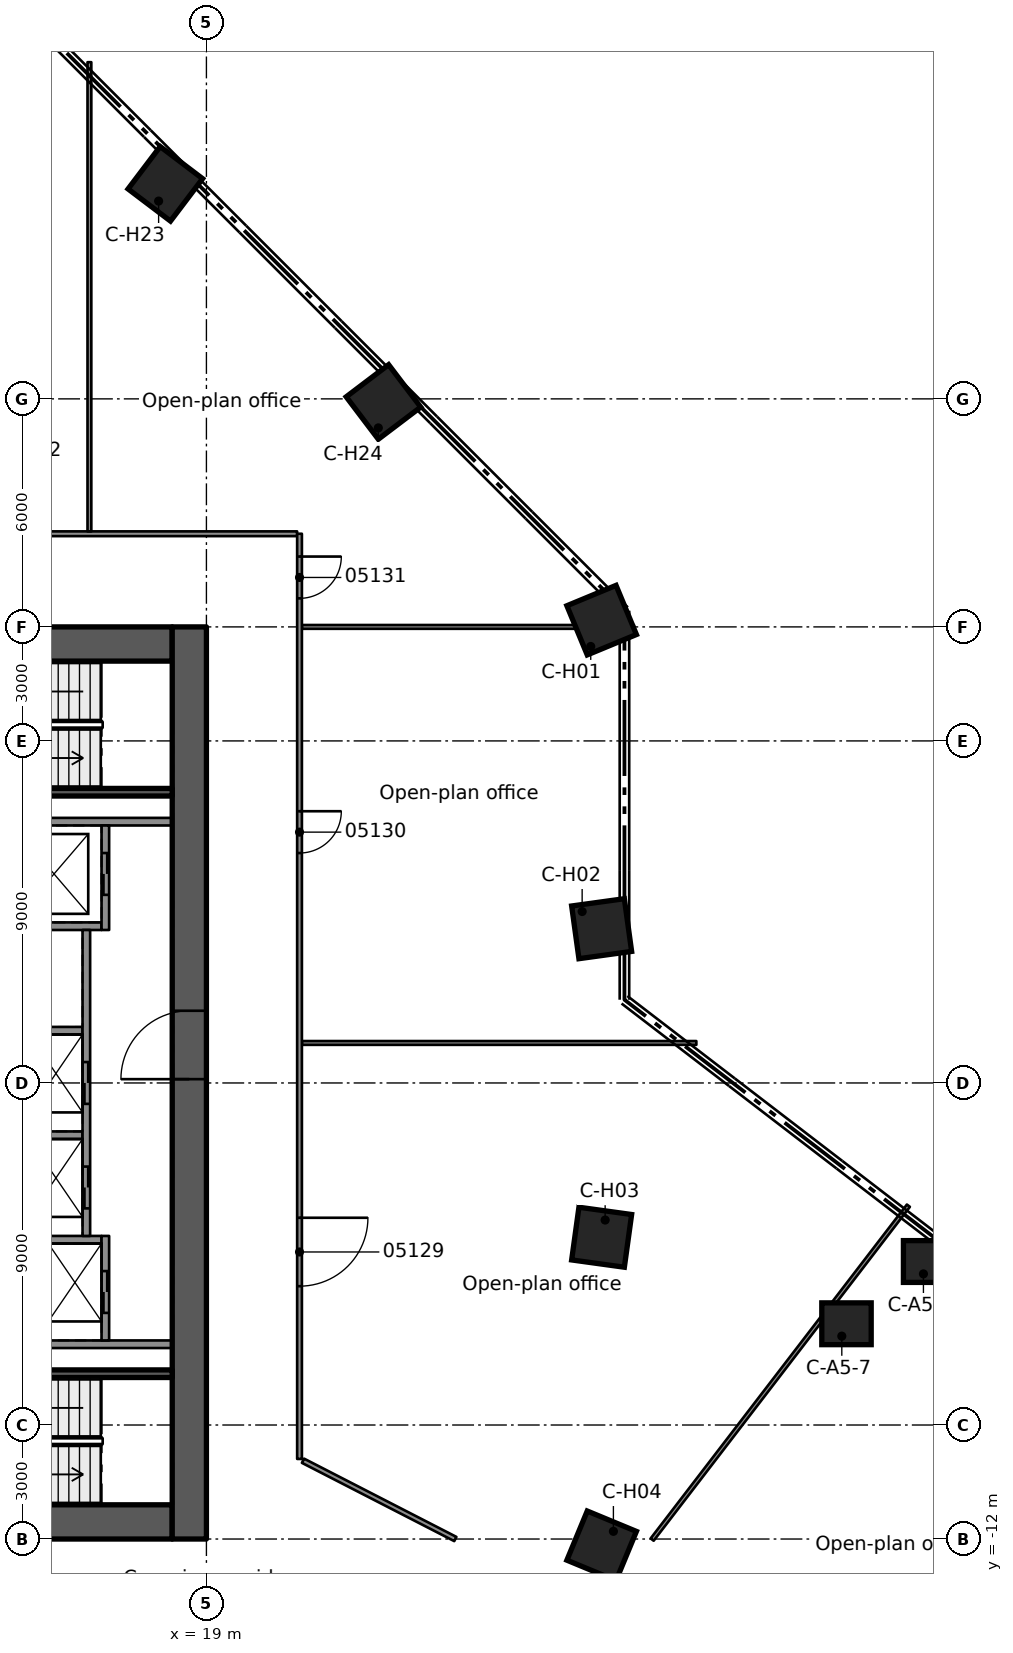
"""IFC4 building model, lengths in metres.
Left out: names, types, materials, properties, quantities, classifications, styles, units other than length and angle.
Written with IfcOpenShell. Run it as: python <this file> out.ifc"""

import sys

from ifc_helpers import new_model, si_unit, direction, frame, frame_2d, origin, origin_2d, place, context, subcontext, project, spatial, rectangle, extrude, element, fill, save


model = new_model("IFC4")
c1 = context("Model", 3, precision=1e-05, world=origin(), true_north=direction((0.0, 1.0)))
c2 = subcontext(c1, "Body", "Model", "MODEL_VIEW")
j1 = project(units=[si_unit("LENGTHUNIT", "METRE"), si_unit("PLANEANGLEUNIT", "RADIAN")], contexts=[c1])
p1 = place(None, origin())
s1 = spatial("IfcSite", under=j1, at=p1, CompositionType="ELEMENT")
p2 = place(p1, origin())
s2 = spatial("IfcBuilding", under=s1, at=p2, CompositionType="ELEMENT")
p3 = place(p2, frame((0.0, 0.0, 25.1)))
s3 = spatial("IfcBuildingStorey", under=s2, at=p3, CompositionType="ELEMENT", Elevation=25.1)
p4 = place(p3, frame((8.9, 11.55, 0.0), z_axis=(0.0, 0.0, 1.0), x_axis=(1.0, 0.0, 0.0)))
e1 = element("IfcWall", 1, at=p4, inside=s3, PredefinedType="SHEAR", context=c2, shape_type="SweptSolid", body=[
    extrude(rectangle(XDim=9.2, YDim=0.9, at=frame_2d((4.6, 0.0))), origin(), (0.0, 0.0, 1.0), 4.1),
])
p5 = place(p4, frame((3.0, 0.0, 0.0)))
e2 = element("IfcOpeningElement", 2, at=p5, cuts=e1, PredefinedType="OPENING", context=c2, shape_type="SweptSolid", body=[
    extrude(rectangle(XDim=1.1, YDim=2.1, at=frame_2d((0.55, 1.05))), frame((0.0, 0.46, 0.0), z_axis=(0.0, -1.0, 0.0), x_axis=(1.0, 0.0, 0.0)), (0.0, 0.0, 1.0), 0.92),
])
p6 = place(p4, frame((0.77, 0.0, 0.0)))
e3 = element("IfcOpeningElement", 3, at=p6, cuts=e1, PredefinedType="OPENING", context=c2, shape_type="SweptSolid", body=[
    extrude(rectangle(XDim=0.9, YDim=2.1, at=frame_2d((0.45, 1.05))), frame((0.0, 0.46, 0.0), z_axis=(0.0, -1.0, 0.0), x_axis=(1.0, 0.0, 0.0)), (0.0, 0.0, 1.0), 0.92),
])
p7 = place(p3, frame((8.9, -11.55, 0.0), z_axis=(0.0, 0.0, 1.0), x_axis=(1.0, 0.0, 0.0)))
e4 = element("IfcWall", 4, at=p7, inside=s3, PredefinedType="SHEAR", context=c2, shape_type="SweptSolid", body=[
    extrude(rectangle(XDim=9.2, YDim=0.9, at=frame_2d((4.6, 0.0))), origin(), (0.0, 0.0, 1.0), 4.1),
])
p8 = place(p7, frame((3.0, 0.0, 0.0)))
e5 = element("IfcOpeningElement", 5, at=p8, cuts=e4, PredefinedType="OPENING", context=c2, shape_type="SweptSolid", body=[
    extrude(rectangle(XDim=1.1, YDim=2.1, at=frame_2d((0.55, 1.05))), frame((0.0, 0.46, 0.0), z_axis=(0.0, -1.0, 0.0), x_axis=(1.0, 0.0, 0.0)), (0.0, 0.0, 1.0), 0.92),
])
p9 = place(p3, frame((18.55, -12.0, 0.0), z_axis=(0.0, 0.0, 1.0), x_axis=(0.0, 1.0, 0.0)))
e6 = element("IfcWall", 6, at=p9, inside=s3, PredefinedType="SHEAR", context=c2, shape_type="SweptSolid", body=[
    extrude(rectangle(XDim=24.0, YDim=0.9, at=frame_2d((12.0, 0.0))), origin(), (0.0, 0.0, 1.0), 4.1),
])
p10 = place(p9, frame((12.1, 0.0, 0.0)))
e7 = element("IfcOpeningElement", 7, at=p10, cuts=e6, PredefinedType="OPENING", context=c2, shape_type="SweptSolid", body=[
    extrude(rectangle(XDim=1.8, YDim=2.1, at=frame_2d((0.9, 1.05))), frame((0.0, 0.46, 0.0), z_axis=(0.0, -1.0, 0.0), x_axis=(1.0, 0.0, 0.0)), (0.0, 0.0, 1.0), 0.92),
])
for number, where, z_axis, x_axis in (
    (8, (37.991, -4.698, 0.0), (0.0, 0.0, 1.0), (1.0, 0.0, 0.0)),
    (9, (35.843, -6.336, 0.0), (0.0, 0.0, 1.0), (1.0, 0.0, 0.0)),
):
    element("IfcColumn", number, at=place(p3, frame(where, z_axis=z_axis, x_axis=x_axis)), inside=s3, PredefinedType="COLUMN", context=c2, shape_type="SweptSolid", body=[
        extrude(rectangle(XDim=1.3, YDim=1.1, at=origin_2d()), origin(), (0.0, 0.0, 1.0), 4.1),
    ])
for number, where, z_axis, x_axis in (
    (10, (29.4, 12.178, 0.0), (0.0, 0.0, 1.0), (0.924, 0.383, 0.0)),
    (11, (29.4, 4.059, 0.0), (0.0, 0.0, 1.0), (0.991, 0.137, 0.0)),
    (12, (29.4, -4.059, 0.0), (0.0, 0.0, 1.0), (0.991, -0.137, 0.0)),
    (13, (29.4, -12.178, 0.0), (0.0, 0.0, 1.0), (0.924, -0.383, 0.0)),
    (14, (17.919, 23.659, 0.0), (0.0, 0.0, 1.0), (0.604, 0.797, 0.0)),
    (15, (23.659, 17.919, 0.0), (0.0, 0.0, 1.0), (0.797, 0.604, 0.0)),
):
    element("IfcColumn", number, at=place(p3, frame(where, z_axis=z_axis, x_axis=x_axis)), inside=s3, PredefinedType="COLUMN", context=c2, shape_type="SweptSolid", body=[
        extrude(rectangle(XDim=1.4, YDim=1.4, at=origin_2d()), origin(), (0.0, 0.0, 1.0), 4.1),
    ])
for number, where, z_axis, x_axis in (
    (16, (11.54, -6.875, 0.0), (0.0, 0.0, 1.0), (1.0, 0.0, 0.0)),
    (17, (11.54, 6.875, 0.0), (0.0, 0.0, 1.0), (1.0, 0.0, 0.0)),
):
    element("IfcWall", number, at=place(p3, frame(where, z_axis=z_axis, x_axis=x_axis)), inside=s3, PredefinedType="SOLIDWALL", context=c2, shape_type="SweptSolid", body=[
        extrude(rectangle(XDim=6.56, YDim=0.2, at=frame_2d((3.28, 0.0))), origin(), (0.0, 0.0, 1.0), 3.69),
    ])
p11 = place(p3, frame((11.54, 4.125, 0.0), z_axis=(0.0, 0.0, 1.0), x_axis=(1.0, 0.0, 0.0)))
e18 = element("IfcWall", 18, at=p11, inside=s3, PredefinedType="SOLIDWALL", context=c2, shape_type="SweptSolid", body=[
    extrude(rectangle(XDim=4.7, YDim=0.2, at=frame_2d((2.35, 0.0))), origin(), (0.0, 0.0, 1.0), 3.69),
])
for number, where, z_axis, x_axis in (
    (19, (11.54, 1.375, 0.0), (0.0, 0.0, 1.0), (1.0, 0.0, 0.0)),
    (20, (11.54, -1.375, 0.0), (0.0, 0.0, 1.0), (1.0, 0.0, 0.0)),
):
    element("IfcWall", number, at=place(p3, frame(where, z_axis=z_axis, x_axis=x_axis)), inside=s3, PredefinedType="SOLIDWALL", context=c2, shape_type="SweptSolid", body=[
        extrude(rectangle(XDim=4.2, YDim=0.2, at=frame_2d((2.1, 0.0))), origin(), (0.0, 0.0, 1.0), 3.69),
    ])
p12 = place(p3, frame((11.54, -4.125, 0.0), z_axis=(0.0, 0.0, 1.0), x_axis=(1.0, 0.0, 0.0)))
e21 = element("IfcWall", 21, at=p12, inside=s3, PredefinedType="SOLIDWALL", context=c2, shape_type="SweptSolid", body=[
    extrude(rectangle(XDim=4.7, YDim=0.2, at=frame_2d((2.35, 0.0))), origin(), (0.0, 0.0, 1.0), 3.69),
])
p13 = place(p3, frame((16.34, 6.775, 0.0), z_axis=(0.0, 0.0, 1.0), x_axis=(0.0, -1.0, 0.0)))
e22 = element("IfcWall", 22, at=p13, inside=s3, PredefinedType="SOLIDWALL", context=c2, shape_type="SweptSolid", body=[
    extrude(rectangle(XDim=2.75, YDim=0.2, at=frame_2d((1.375, 0.0))), origin(), (0.0, 0.0, 1.0), 3.69),
])
p14 = place(p13, frame((0.725, 0.0, 0.0)))
e23 = element("IfcOpeningElement", 23, at=p14, cuts=e22, PredefinedType="OPENING", context=c2, shape_type="SweptSolid", body=[
    extrude(rectangle(XDim=1.1, YDim=2.1, at=frame_2d((0.55, 1.05))), frame((0.0, 0.11, 0.0), z_axis=(0.0, -1.0, 0.0), x_axis=(1.0, 0.0, 0.0)), (0.0, 0.0, 1.0), 0.22),
])
p15 = place(p3, frame((15.84, 4.025, 0.0), z_axis=(0.0, 0.0, 1.0), x_axis=(0.0, -1.0, 0.0)))
e24 = element("IfcWall", 24, at=p15, inside=s3, PredefinedType="SOLIDWALL", context=c2, shape_type="SweptSolid", body=[
    extrude(rectangle(XDim=8.05, YDim=0.2, at=frame_2d((4.025, 0.0))), origin(), (0.0, 0.0, 1.0), 3.69),
])
p16 = place(p15, frame((3.475, 0.0, 0.0)))
e25 = element("IfcOpeningElement", 25, at=p16, cuts=e24, PredefinedType="OPENING", context=c2, shape_type="SweptSolid", body=[
    extrude(rectangle(XDim=1.1, YDim=2.1, at=frame_2d((0.55, 1.05))), frame((0.0, 0.11, 0.0), z_axis=(0.0, -1.0, 0.0), x_axis=(1.0, 0.0, 0.0)), (0.0, 0.0, 1.0), 0.22),
])
p17 = place(p15, frame((6.225, 0.0, 0.0)))
e26 = element("IfcOpeningElement", 26, at=p17, cuts=e24, PredefinedType="OPENING", context=c2, shape_type="SweptSolid", body=[
    extrude(rectangle(XDim=1.1, YDim=2.1, at=frame_2d((0.55, 1.05))), frame((0.0, 0.11, 0.0), z_axis=(0.0, -1.0, 0.0), x_axis=(1.0, 0.0, 0.0)), (0.0, 0.0, 1.0), 0.22),
])
p18 = place(p3, frame((16.34, -4.025, 0.0), z_axis=(0.0, 0.0, 1.0), x_axis=(0.0, -1.0, 0.0)))
e27 = element("IfcWall", 27, at=p18, inside=s3, PredefinedType="SOLIDWALL", context=c2, shape_type="SweptSolid", body=[
    extrude(rectangle(XDim=2.75, YDim=0.2, at=frame_2d((1.375, 0.0))), origin(), (0.0, 0.0, 1.0), 3.69),
])
p19 = place(p18, frame((0.925, 0.0, 0.0)))
e28 = element("IfcOpeningElement", 28, at=p19, cuts=e27, PredefinedType="OPENING", context=c2, shape_type="SweptSolid", body=[
    extrude(rectangle(XDim=1.1, YDim=2.1, at=frame_2d((0.55, 1.05))), frame((0.0, 0.11, 0.0), z_axis=(0.0, -1.0, 0.0), x_axis=(1.0, 0.0, 0.0)), (0.0, 0.0, 1.0), 0.22),
])
for number, where, z_axis, x_axis in (
    (29, (11.54, -7.65, 0.0), (0.0, 0.0, 1.0), (1.0, 0.0, 0.0)),
    (30, (11.54, 7.65, 0.0), (0.0, 0.0, 1.0), (1.0, 0.0, 0.0)),
):
    element("IfcWall", number, at=place(p3, frame(where, z_axis=z_axis, x_axis=x_axis)), inside=s3, PredefinedType="SOLIDWALL", context=c2, shape_type="SweptSolid", body=[
        extrude(rectangle(XDim=6.56, YDim=0.2, at=frame_2d((3.28, 0.0))), origin(), (0.0, 0.0, 1.0), 3.69),
    ])
p20 = place(p3, frame((21.541, -9.94, 0.0), z_axis=(0.0, 0.0, 1.0), x_axis=(0.889443846495, -0.457044466033, 0.0)))
e31 = element("IfcWall", 31, at=p20, inside=s3, PredefinedType="PARTITIONING", context=c2, shape_type="SweptSolid", body=[
    extrude(rectangle(XDim=4.507, YDim=0.125, at=frame_2d((2.254, 0.0))), origin(), (0.0, 0.0, 1.0), 3.68),
])
p21 = place(p3, frame((21.512, 1.053, 0.0), z_axis=(0.0, 0.0, 1.0), x_axis=(1.0, 0.0, 0.0)))
e32 = element("IfcWall", 32, at=p21, inside=s3, PredefinedType="PARTITIONING", context=c2, shape_type="SweptSolid", body=[
    extrude(rectangle(XDim=10.38, YDim=0.1, at=frame_2d((5.19, 0.0))), origin(), (0.0, 0.0, 1.0), 3.68),
])
p22 = place(p3, frame((21.512, 12.0, 0.0), z_axis=(0.0, 0.0, 1.0), x_axis=(1.0, 0.0, 0.0)))
e33 = element("IfcWall", 33, at=p22, inside=s3, PredefinedType="PARTITIONING", context=c2, shape_type="SweptSolid", body=[
    extrude(rectangle(XDim=8.738, YDim=0.1, at=frame_2d((4.369, 0.0))), origin(), (0.0, 0.0, 1.0), 3.68),
])
p23 = place(p3, frame((10.391, 14.451, 0.0), z_axis=(0.0, 0.0, 1.0), x_axis=(1.0, 0.0, 0.0)))
e34 = element("IfcWall", 34, at=p23, inside=s3, PredefinedType="PARTITIONING", context=c2, shape_type="SweptSolid", body=[
    extrude(rectangle(XDim=10.996, YDim=0.125, at=frame_2d((5.498, 0.0))), origin(), (0.0, 0.0, 1.0), 3.68),
])
p24 = place(p23, frame((1.85, 0.0, 0.0)))
e35 = element("IfcOpeningElement", 35, at=p24, cuts=e34, PredefinedType="OPENING", context=c2, shape_type="SweptSolid", body=[
    extrude(rectangle(XDim=1.8, YDim=2.1, at=frame_2d((0.9, 1.05))), frame((0.0, 0.073, 0.0), z_axis=(0.0, -1.0, 0.0), x_axis=(1.0, 0.0, 0.0)), (0.0, 0.0, 1.0), 0.145),
])
p25 = place(p3, frame((37.042, -20.718, 0.0), z_axis=(0.0, 0.0, 1.0), x_axis=(0.608775561638, 0.793342495743, 0.0)))
e36 = element("IfcWall", 36, at=p25, inside=s3, PredefinedType="PARTITIONING", context=c2, shape_type="SweptSolid", body=[
    extrude(rectangle(XDim=14.136, YDim=0.1, at=frame_2d((7.068, 0.0))), origin(), (0.0, 0.0, 1.0), 3.68),
])
p26 = place(p3, frame((30.729, -12.015, 0.0), z_axis=(0.0, 0.0, 1.0), x_axis=(0.608833626101, 0.793297936294, 0.0)))
e37 = element("IfcWall", 37, at=p26, inside=s3, PredefinedType="PARTITIONING", context=c2, shape_type="SweptSolid", body=[
    extrude(rectangle(XDim=11.075, YDim=0.1, at=frame_2d((5.538, 0.0))), origin(), (0.0, 0.0, 1.0), 3.68),
])
p27 = place(p3, frame((21.45, 14.451, 0.0), z_axis=(0.0, 0.0, 1.0), x_axis=(0.0, -1.0, 0.0)))
e38 = element("IfcWall", 38, at=p27, inside=s3, PredefinedType="PARTITIONING", context=c2, shape_type="SweptSolid", body=[
    extrude(rectangle(XDim=24.344, YDim=0.125, at=frame_2d((12.172, 0.0))), origin(), (0.0, 0.0, 1.0), 3.68),
])
p28 = place(p27, frame((17.998, 0.0, 0.0)))
e39 = element("IfcOpeningElement", 39, at=p28, cuts=e38, PredefinedType="OPENING", context=c2, shape_type="SweptSolid", body=[
    extrude(rectangle(XDim=1.8, YDim=2.1, at=frame_2d((0.9, 1.05))), frame((0.0, 0.073, 0.0), z_axis=(0.0, -1.0, 0.0), x_axis=(1.0, 0.0, 0.0)), (0.0, 0.0, 1.0), 0.145),
])
p29 = place(p27, frame((7.301, 0.0, 0.0)))
e40 = element("IfcOpeningElement", 40, at=p29, cuts=e38, PredefinedType="OPENING", context=c2, shape_type="SweptSolid", body=[
    extrude(rectangle(XDim=1.1, YDim=2.1, at=frame_2d((0.55, 1.05))), frame((0.0, 0.073, 0.0), z_axis=(0.0, -1.0, 0.0), x_axis=(1.0, 0.0, 0.0)), (0.0, 0.0, 1.0), 0.145),
])
p30 = place(p27, frame((0.6, 0.0, 0.0)))
e41 = element("IfcOpeningElement", 41, at=p30, cuts=e38, PredefinedType="OPENING", context=c2, shape_type="SweptSolid", body=[
    extrude(rectangle(XDim=1.1, YDim=2.1, at=frame_2d((0.55, 1.05))), frame((0.0, 0.073, 0.0), z_axis=(0.0, -1.0, 0.0), x_axis=(1.0, 0.0, 0.0)), (0.0, 0.0, 1.0), 0.145),
])
p31 = place(p3, frame((15.921, 14.514, 0.0), z_axis=(0.0, 0.0, 1.0), x_axis=(0.0, 1.0, 0.0)))
e42 = element("IfcWall", 42, at=p31, inside=s3, PredefinedType="PARTITIONING", context=c2, shape_type="SweptSolid", body=[
    extrude(rectangle(XDim=12.345, YDim=0.1, at=frame_2d((6.172, 0.0))), origin(), (0.0, 0.0, 1.0), 3.68),
])
p32 = place(p14, origin())
e43 = element("IfcDoor", 43, at=p32, inside=s3, OperationType="DOUBLE_DOOR_SLIDING", PredefinedType="DOOR", context=c2, shape_type="SweptSolid", body=[
    extrude(rectangle(XDim=1.1, YDim=2.1, at=frame_2d((0.55, 1.05))), frame((0.0, 0.025, 0.0), z_axis=(0.0, -1.0, 0.0), x_axis=(1.0, 0.0, 0.0)), (0.0, 0.0, 1.0), 0.05),
])
fill(e23, e43)
p33 = place(p16, origin())
e44 = element("IfcDoor", 44, at=p33, inside=s3, OperationType="DOUBLE_DOOR_SLIDING", PredefinedType="DOOR", context=c2, shape_type="SweptSolid", body=[
    extrude(rectangle(XDim=1.1, YDim=2.1, at=frame_2d((0.55, 1.05))), frame((0.0, 0.025, 0.0), z_axis=(0.0, -1.0, 0.0), x_axis=(1.0, 0.0, 0.0)), (0.0, 0.0, 1.0), 0.05),
])
fill(e25, e44)
p34 = place(p17, origin())
e45 = element("IfcDoor", 45, at=p34, inside=s3, OperationType="DOUBLE_DOOR_SLIDING", PredefinedType="DOOR", context=c2, shape_type="SweptSolid", body=[
    extrude(rectangle(XDim=1.1, YDim=2.1, at=frame_2d((0.55, 1.05))), frame((0.0, 0.025, 0.0), z_axis=(0.0, -1.0, 0.0), x_axis=(1.0, 0.0, 0.0)), (0.0, 0.0, 1.0), 0.05),
])
fill(e26, e45)
p35 = place(p19, origin())
e46 = element("IfcDoor", 46, at=p35, inside=s3, OperationType="DOUBLE_DOOR_SLIDING", PredefinedType="DOOR", context=c2, shape_type="SweptSolid", body=[
    extrude(rectangle(XDim=1.1, YDim=2.1, at=frame_2d((0.55, 1.05))), frame((0.0, 0.025, 0.0), z_axis=(0.0, -1.0, 0.0), x_axis=(1.0, 0.0, 0.0)), (0.0, 0.0, 1.0), 0.05),
])
fill(e28, e46)
p36 = place(p10, origin())
e47 = element("IfcDoor", 47, at=p36, inside=s3, OperationType="SINGLE_SWING_RIGHT", PredefinedType="DOOR", context=c2, shape_type="SweptSolid", body=[
    extrude(rectangle(XDim=1.8, YDim=2.1, at=frame_2d((0.9, 1.05))), frame((0.0, 0.025, 0.0), z_axis=(0.0, -1.0, 0.0), x_axis=(1.0, 0.0, 0.0)), (0.0, 0.0, 1.0), 0.05),
])
fill(e7, e47)
p37 = place(p28, origin())
e48 = element("IfcDoor", 48, at=p37, inside=s3, OperationType="DOUBLE_DOOR_SINGLE_SWING", PredefinedType="DOOR", context=c2, shape_type="SweptSolid", body=[
    extrude(rectangle(XDim=1.8, YDim=2.1, at=frame_2d((0.9, 1.05))), frame((0.0, 0.025, 0.0), z_axis=(0.0, -1.0, 0.0), x_axis=(1.0, 0.0, 0.0)), (0.0, 0.0, 1.0), 0.05),
])
fill(e39, e48)
p38 = place(p29, origin())
e49 = element("IfcDoor", 49, at=p38, inside=s3, OperationType="SINGLE_SWING_LEFT", PredefinedType="DOOR", context=c2, shape_type="SweptSolid", body=[
    extrude(rectangle(XDim=1.1, YDim=2.1, at=frame_2d((0.55, 1.05))), frame((0.0, 0.025, 0.0), z_axis=(0.0, -1.0, 0.0), x_axis=(1.0, 0.0, 0.0)), (0.0, 0.0, 1.0), 0.05),
])
fill(e40, e49)
p39 = place(p30, origin())
e50 = element("IfcDoor", 50, at=p39, inside=s3, OperationType="SINGLE_SWING_LEFT", PredefinedType="DOOR", context=c2, shape_type="SweptSolid", body=[
    extrude(rectangle(XDim=1.1, YDim=2.1, at=frame_2d((0.55, 1.05))), frame((0.0, 0.025, 0.0), z_axis=(0.0, -1.0, 0.0), x_axis=(1.0, 0.0, 0.0)), (0.0, 0.0, 1.0), 0.05),
])
fill(e41, e50)
save(model, sys.argv[1])
